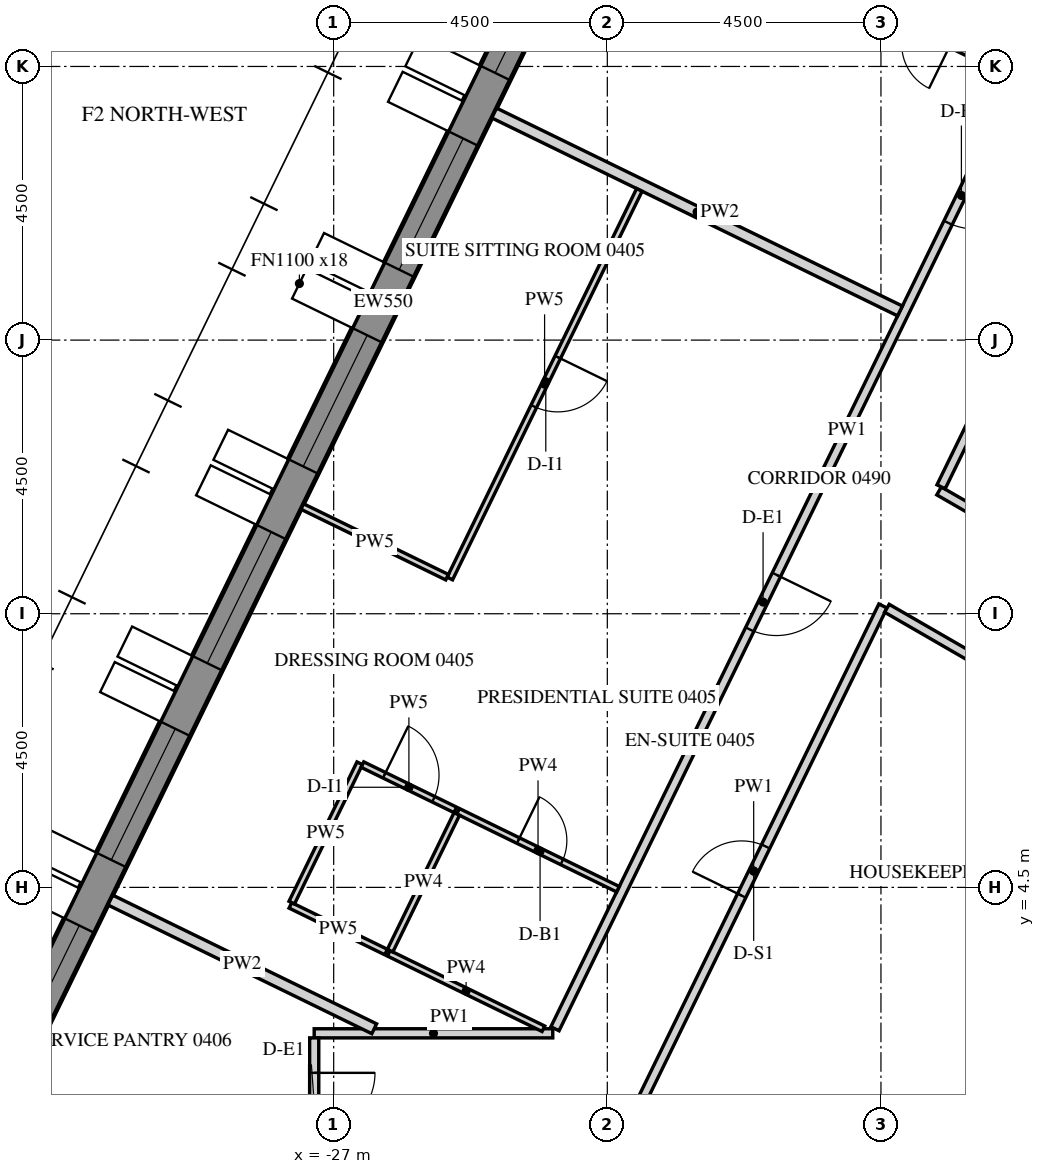
"""IFC4 building model, lengths in metres.
Left out: names, types, materials, properties, quantities, classifications, styles, units other than length and angle.
Written with IfcOpenShell. Run it as: python <this file> out.ifc"""

import sys

from ifc_helpers import new_model, si_unit, direction, frame, frame_2d, origin, place, context, subcontext, project, spatial, polyline, rectangle, outline, extrude, element, fill, save


model = new_model("IFC4")
c1 = context("Model", 3, precision=1e-05, world=origin(), true_north=direction((0.0, 1.0)))
c2 = subcontext(c1, "Body", "Model", "MODEL_VIEW")
j1 = project(units=[si_unit("LENGTHUNIT", "METRE"), si_unit("PLANEANGLEUNIT", "RADIAN")], contexts=[c1])
p1 = place(None, origin())
s1 = spatial("IfcSite", under=j1, at=p1, CompositionType="ELEMENT")
p2 = place(p1, origin())
s2 = spatial("IfcBuilding", under=s1, at=p2, CompositionType="ELEMENT")
p3 = place(p2, frame((0.0, 0.0, 68.7)))
s3 = spatial("IfcBuildingStorey", under=s2, at=p3, CompositionType="ELEMENT", Elevation=68.7)
p4 = place(p3, frame((-19.595, 27.633, -0.15), z_axis=(0.0, 0.0, 1.0), x_axis=(-0.438368285794, -0.898795441694, 0.0)))
e1 = element("IfcWall", 1, at=p4, inside=s3, PredefinedType="SOLIDWALL", context=c2, shape_type="SweptSolid", body=[
    extrude(outline(polyline([(-0.026, -0.275), (30.093, -0.275), (30.048, 0.275), (0.026, 0.275), (-0.026, -0.275)])), origin(), (0.0, 0.0, 1.0), 3.9),
])
p5 = place(p4, frame((1.236, 0.0, 1.05)))
e2 = element("IfcOpeningElement", 2, at=p5, cuts=e1, PredefinedType="OPENING", context=c2, shape_type="SweptSolid", body=[
    extrude(rectangle(XDim=2.4, YDim=2.4, at=frame_2d((1.2, 1.2))), frame((0.0, 0.285, 0.0), z_axis=(0.0, -1.0, 0.0), x_axis=(1.0, 0.0, 0.0)), (0.0, 0.0, 1.0), 0.57),
])
p6 = place(p4, frame((4.835, 0.0, 1.05)))
e3 = element("IfcOpeningElement", 3, at=p6, cuts=e1, PredefinedType="OPENING", context=c2, shape_type="SweptSolid", body=[
    extrude(rectangle(XDim=2.4, YDim=2.4, at=frame_2d((1.2, 1.2))), frame((0.0, 0.285, 0.0), z_axis=(0.0, -1.0, 0.0), x_axis=(1.0, 0.0, 0.0)), (0.0, 0.0, 1.0), 0.57),
])
p7 = place(p4, frame((8.436, 0.0, 1.05)))
e4 = element("IfcOpeningElement", 4, at=p7, cuts=e1, PredefinedType="OPENING", context=c2, shape_type="SweptSolid", body=[
    extrude(rectangle(XDim=2.4, YDim=2.4, at=frame_2d((1.2, 1.2))), frame((0.0, 0.285, 0.0), z_axis=(0.0, -1.0, 0.0), x_axis=(1.0, 0.0, 0.0)), (0.0, 0.0, 1.0), 0.57),
])
p8 = place(p4, frame((12.035, 0.0, 1.05)))
e5 = element("IfcOpeningElement", 5, at=p8, cuts=e1, PredefinedType="OPENING", context=c2, shape_type="SweptSolid", body=[
    extrude(rectangle(XDim=2.4, YDim=2.4, at=frame_2d((1.2, 1.2))), frame((0.0, 0.285, 0.0), z_axis=(0.0, -1.0, 0.0), x_axis=(1.0, 0.0, 0.0)), (0.0, 0.0, 1.0), 0.57),
])
p9 = place(p4, frame((15.635, 0.0, 1.05)))
e6 = element("IfcOpeningElement", 6, at=p9, cuts=e1, PredefinedType="OPENING", context=c2, shape_type="SweptSolid", body=[
    extrude(rectangle(XDim=2.4, YDim=2.4, at=frame_2d((1.2, 1.2))), frame((0.0, 0.285, 0.0), z_axis=(0.0, -1.0, 0.0), x_axis=(1.0, 0.0, 0.0)), (0.0, 0.0, 1.0), 0.57),
])
p10 = place(p4, frame((19.236, 0.0, 1.05)))
e7 = element("IfcOpeningElement", 7, at=p10, cuts=e1, PredefinedType="OPENING", context=c2, shape_type="SweptSolid", body=[
    extrude(rectangle(XDim=2.4, YDim=2.4, at=frame_2d((1.2, 1.2))), frame((0.0, 0.285, 0.0), z_axis=(0.0, -1.0, 0.0), x_axis=(1.0, 0.0, 0.0)), (0.0, 0.0, 1.0), 0.57),
])
p11 = place(p4, frame((22.835, 0.0, 1.05)))
e8 = element("IfcOpeningElement", 8, at=p11, cuts=e1, PredefinedType="OPENING", context=c2, shape_type="SweptSolid", body=[
    extrude(rectangle(XDim=2.4, YDim=2.4, at=frame_2d((1.2, 1.2))), frame((0.0, 0.285, 0.0), z_axis=(0.0, -1.0, 0.0), x_axis=(1.0, 0.0, 0.0)), (0.0, 0.0, 1.0), 0.57),
])
p12 = place(p4, frame((26.436, 0.0, 1.05)))
e9 = element("IfcOpeningElement", 9, at=p12, cuts=e1, PredefinedType="OPENING", context=c2, shape_type="SweptSolid", body=[
    extrude(rectangle(XDim=2.4, YDim=2.4, at=frame_2d((1.2, 1.2))), frame((0.0, 0.285, 0.0), z_axis=(0.0, -1.0, 0.0), x_axis=(1.0, 0.0, 0.0)), (0.0, 0.0, 1.0), 0.57),
])
p13 = place(p3, frame((-13.752, 21.875, 0.0), z_axis=(0.0, 0.0, 1.0), x_axis=(-0.438374473378, -0.898792423806, 0.0)))
e10 = element("IfcWall", 10, at=p13, inside=s3, PredefinedType="PARTITIONING", context=c2, shape_type="SweptSolid", body=[
    extrude(rectangle(XDim=21.918, YDim=0.15, at=frame_2d((10.959, 0.0))), origin(), (0.0, 0.0, 1.0), 2.988),
])
p14 = place(p13, frame((0.371, 0.0, 0.0)))
e11 = element("IfcOpeningElement", 11, at=p14, cuts=e10, PredefinedType="OPENING", context=c2, shape_type="SweptSolid", body=[
    extrude(rectangle(XDim=1.0, YDim=2.1, at=frame_2d((0.5, 1.05))), frame((0.0, 0.085, 0.0), z_axis=(0.0, -1.0, 0.0), x_axis=(1.0, 0.0, 0.0)), (0.0, 0.0, 1.0), 0.17),
])
p15 = place(p13, frame((6.171, 0.0, 0.0)))
e12 = element("IfcOpeningElement", 12, at=p15, cuts=e10, PredefinedType="OPENING", context=c2, shape_type="SweptSolid", body=[
    extrude(rectangle(XDim=1.0, YDim=2.1, at=frame_2d((0.5, 1.05))), frame((0.0, 0.085, 0.0), z_axis=(0.0, -1.0, 0.0), x_axis=(1.0, 0.0, 0.0)), (0.0, 0.0, 1.0), 0.17),
])
p16 = place(p13, frame((13.612, 0.0, 0.0)))
e13 = element("IfcOpeningElement", 13, at=p16, cuts=e10, PredefinedType="OPENING", context=c2, shape_type="SweptSolid", body=[
    extrude(rectangle(XDim=1.0, YDim=2.1, at=frame_2d((0.5, 1.05))), frame((0.0, 0.085, 0.0), z_axis=(0.0, -1.0, 0.0), x_axis=(1.0, 0.0, 0.0)), (0.0, 0.0, 1.0), 0.17),
])
p17 = place(p3, frame((-23.397, 2.1, 0.0), z_axis=(0.0, 0.0, 1.0), x_axis=(-1.0, 0.0, 0.0)))
e14 = element("IfcWall", 14, at=p17, inside=s3, PredefinedType="PARTITIONING", context=c2, shape_type="SweptSolid", body=[
    extrude(rectangle(XDim=3.923, YDim=0.15, at=frame_2d((1.961, 0.0))), origin(), (0.0, 0.0, 1.0), 2.988),
])
p18 = place(p3, frame((-27.32, 2.025, 0.0), z_axis=(0.0, 0.0, 1.0), x_axis=(0.0, -1.0, 0.0)))
e15 = element("IfcWall", 15, at=p18, inside=s3, PredefinedType="PARTITIONING", context=c2, shape_type="SweptSolid", body=[
    extrude(rectangle(XDim=1.725, YDim=0.15, at=frame_2d((0.862, 0.0))), origin(), (0.0, 0.0, 1.0), 2.988),
])
p19 = place(p18, frame((0.575, 0.0, 0.0)))
e16 = element("IfcOpeningElement", 16, at=p19, cuts=e15, PredefinedType="OPENING", context=c2, shape_type="SweptSolid", body=[
    extrude(rectangle(XDim=1.0, YDim=2.1, at=frame_2d((0.5, 1.05))), frame((0.0, 0.085, 0.0), z_axis=(0.0, -1.0, 0.0), x_axis=(1.0, 0.0, 0.0)), (0.0, 0.0, 1.0), 0.17),
])
p20 = place(p3, frame((-11.614, 7.884, 0.0), z_axis=(0.0, 0.0, 1.0), x_axis=(-0.866025438137, 0.4999999405, 0.0)))
e17 = element("IfcWall", 17, at=p20, inside=s3, PredefinedType="PARTITIONING", context=c2, shape_type="SweptSolid", body=[
    extrude(rectangle(XDim=6.271, YDim=0.15, at=frame_2d((3.135, 0.0))), origin(), (0.0, 0.0, 1.0), 2.988),
])
p21 = place(p3, frame((-17.011, 11.087, 0.0), z_axis=(0.0, 0.0, 1.0), x_axis=(0.43836877185, 0.898795204631, 0.0)))
e18 = element("IfcWall", 18, at=p21, inside=s3, PredefinedType="PARTITIONING", context=c2, shape_type="SweptSolid", body=[
    extrude(rectangle(XDim=10.083, YDim=0.15, at=frame_2d((5.042, 0.0))), origin(), (0.0, 0.0, 1.0), 2.988),
])
p22 = place(p3, frame((-22.219, 0.41, 0.0), z_axis=(0.0, 0.0, 1.0), x_axis=(0.438391891827, 0.898783927972, 0.0)))
e19 = element("IfcWall", 19, at=p22, inside=s3, PredefinedType="PARTITIONING", context=c2, shape_type="SweptSolid", body=[
    extrude(rectangle(XDim=9.699, YDim=0.15, at=frame_2d((4.85, 0.0))), origin(), (0.0, 0.0, 1.0), 2.988),
])
p23 = place(p22, frame((4.4, 0.0, 0.0)))
e20 = element("IfcOpeningElement", 20, at=p23, cuts=e19, PredefinedType="OPENING", context=c2, shape_type="SweptSolid", body=[
    extrude(rectangle(XDim=0.9, YDim=2.1, at=frame_2d((0.45, 1.05))), frame((0.0, 0.085, 0.0), z_axis=(0.0, -1.0, 0.0), x_axis=(1.0, 0.0, 0.0)), (0.0, 0.0, 1.0), 0.17),
])
p24 = place(p3, frame((-17.902, 9.09, 0.0), z_axis=(0.0, 0.0, 1.0), x_axis=(0.866036368755, -0.499981007633, 0.0)))
e21 = element("IfcWall", 21, at=p24, inside=s3, PredefinedType="PARTITIONING", context=c2, shape_type="SweptSolid", body=[
    extrude(rectangle(XDim=6.049, YDim=0.15, at=frame_2d((3.024, 0.0))), origin(), (0.0, 0.0, 1.0), 2.988),
])
p25 = place(p3, frame((-15.802, 17.844, 0.0), z_axis=(0.0, 0.0, 1.0), x_axis=(-0.898790906006, 0.438377585285, 0.0)))
e22 = element("IfcWall", 22, at=p25, inside=s3, PredefinedType="PARTITIONING", context=c2, shape_type="SweptSolid", body=[
    extrude(rectangle(XDim=2.925, YDim=0.1, at=frame_2d((1.462, 0.0))), origin(), (0.0, 0.0, 1.0), 2.988),
])
p26 = place(p25, frame((1.175, 0.0, 0.0)))
e23 = element("IfcOpeningElement", 23, at=p26, cuts=e22, PredefinedType="OPENING", context=c2, shape_type="SweptSolid", body=[
    extrude(rectangle(XDim=0.8, YDim=2.1, at=frame_2d((0.4, 1.05))), frame((0.0, 0.06, 0.0), z_axis=(0.0, -1.0, 0.0), x_axis=(1.0, 0.0, 0.0)), (0.0, 0.0, 1.0), 0.12),
])
p27 = place(p3, frame((-24.36, 17.234, 0.0), z_axis=(0.0, 0.0, 1.0), x_axis=(0.898796252669, -0.438366623032, 0.0)))
e24 = element("IfcWall", 24, at=p27, inside=s3, PredefinedType="PARTITIONING", context=c2, shape_type="SweptSolid", body=[
    extrude(rectangle(XDim=7.425, YDim=0.18, at=frame_2d((3.712, 0.0))), origin(), (0.0, 0.0, 1.0), 2.988),
])
p28 = place(p3, frame((-23.551, 2.175, 0.0), z_axis=(0.0, 0.0, 1.0), x_axis=(-0.89881903386, 0.438319910991, 0.0)))
e25 = element("IfcWall", 25, at=p28, inside=s3, PredefinedType="PARTITIONING", context=c2, shape_type="SweptSolid", body=[
    extrude(rectangle(XDim=2.829, YDim=0.1, at=frame_2d((1.415, 0.0))), origin(), (0.0, 0.0, 1.0), 2.988),
])
p29 = place(p3, frame((-24.954, 5.752, 0.0), z_axis=(0.0, 0.0, 1.0), x_axis=(0.89880694479, -0.438344699976, 0.0)))
e26 = element("IfcWall", 26, at=p29, inside=s3, PredefinedType="PARTITIONING", context=c2, shape_type="SweptSolid", body=[
    extrude(rectangle(XDim=2.925, YDim=0.1, at=frame_2d((1.462, 0.0))), origin(), (0.0, 0.0, 1.0), 2.988),
])
p30 = place(p29, frame((1.1, 0.0, 0.0)))
e27 = element("IfcOpeningElement", 27, at=p30, cuts=e26, PredefinedType="OPENING", context=c2, shape_type="SweptSolid", body=[
    extrude(rectangle(XDim=0.8, YDim=2.1, at=frame_2d((0.4, 1.05))), frame((0.0, 0.06, 0.0), z_axis=(0.0, -1.0, 0.0), x_axis=(1.0, 0.0, 0.0)), (0.0, 0.0, 1.0), 0.12),
])
p31 = place(p3, frame((-26.139, 3.437, 0.0), z_axis=(0.0, 0.0, 1.0), x_axis=(-0.89881938742, 0.438319185981, 0.0)))
e28 = element("IfcWall", 28, at=p31, inside=s3, PredefinedType="PARTITIONING", context=c2, shape_type="SweptSolid", body=[
    extrude(rectangle(XDim=1.75, YDim=0.1, at=frame_2d((0.875, 0.0))), origin(), (0.0, 0.0, 1.0), 2.988),
])
p32 = place(p3, frame((-27.69, 4.249, 0.0), z_axis=(0.0, 0.0, 1.0), x_axis=(0.438384020656, 0.898787767181, 0.0)))
e29 = element("IfcWall", 29, at=p32, inside=s3, PredefinedType="PARTITIONING", context=c2, shape_type="SweptSolid", body=[
    extrude(rectangle(XDim=2.55, YDim=0.1, at=frame_2d((1.275, 0.0))), origin(), (0.0, 0.0, 1.0), 2.988),
])
p33 = place(p3, frame((-26.527, 6.519, 0.0), z_axis=(0.0, 0.0, 1.0), x_axis=(0.898807091918, -0.438344398296, 0.0)))
e30 = element("IfcWall", 30, at=p33, inside=s3, PredefinedType="PARTITIONING", context=c2, shape_type="SweptSolid", body=[
    extrude(rectangle(XDim=1.7, YDim=0.1, at=frame_2d((0.85, 0.0))), origin(), (0.0, 0.0, 1.0), 2.988),
])
p34 = place(p33, frame((0.4, 0.0, 0.0)))
e31 = element("IfcOpeningElement", 31, at=p34, cuts=e30, PredefinedType="OPENING", context=c2, shape_type="SweptSolid", body=[
    extrude(rectangle(XDim=0.9, YDim=2.1, at=frame_2d((0.45, 1.05))), frame((0.0, 0.06, 0.0), z_axis=(0.0, -1.0, 0.0), x_axis=(1.0, 0.0, 0.0)), (0.0, 0.0, 1.0), 0.12),
])
p35 = place(p3, frame((-21.973, 15.97, 0.0), z_axis=(0.0, 0.0, 1.0), x_axis=(-0.438360036982, -0.898799464829, 0.0)))
e32 = element("IfcWall", 32, at=p35, inside=s3, PredefinedType="PARTITIONING", context=c2, shape_type="SweptSolid", body=[
    extrude(rectangle(XDim=7.11, YDim=0.1, at=frame_2d((3.555, 0.0))), origin(), (0.0, 0.0, 1.0), 2.988),
])
p36 = place(p35, frame((3.06, 0.0, 0.0)))
e33 = element("IfcOpeningElement", 33, at=p36, cuts=e32, PredefinedType="OPENING", context=c2, shape_type="SweptSolid", body=[
    extrude(rectangle(XDim=0.9, YDim=2.1, at=frame_2d((0.45, 1.05))), frame((0.0, 0.06, 0.0), z_axis=(0.0, -1.0, 0.0), x_axis=(1.0, 0.0, 0.0)), (0.0, 0.0, 1.0), 0.12),
])
p37 = place(p3, frame((-25.135, 9.601, 0.0), z_axis=(0.0, 0.0, 1.0), x_axis=(-0.898787925725, 0.438383695602, 0.0)))
e34 = element("IfcWall", 34, at=p37, inside=s3, PredefinedType="PARTITIONING", context=c2, shape_type="SweptSolid", body=[
    extrude(rectangle(XDim=2.65, YDim=0.1, at=frame_2d((1.325, 0.0))), origin(), (0.0, 0.0, 1.0), 2.988),
])
p38 = place(p3, frame((-30.673, 4.292, 0.0), z_axis=(0.0, 0.0, 1.0), x_axis=(0.898812662672, -0.438332975512, 0.0)))
e35 = element("IfcWall", 35, at=p38, inside=s3, PredefinedType="PARTITIONING", context=c2, shape_type="SweptSolid", body=[
    extrude(rectangle(XDim=4.828, YDim=0.18, at=frame_2d((2.414, 0.0))), origin(), (0.0, 0.0, 1.0), 2.988),
])
p39 = place(p3, frame((-24.976, 5.707, 0.0), z_axis=(0.0, 0.0, 1.0), x_axis=(-0.438363988158, -0.898797537761, 0.0)))
e36 = element("IfcWall", 36, at=p39, inside=s3, PredefinedType="PARTITIONING", context=c2, shape_type="SweptSolid", body=[
    extrude(rectangle(XDim=2.5, YDim=0.1, at=frame_2d((1.25, 0.0))), origin(), (0.0, 0.0, 1.0), 2.988),
])
p40 = place(p7, frame((0.0, 0.205, 0.0)))
e37 = element("IfcWindow", 37, at=p40, inside=s3, PartitioningType="DOUBLE_PANEL_VERTICAL", PredefinedType="WINDOW", context=c2, shape_type="SweptSolid", body=[
    extrude(rectangle(XDim=2.4, YDim=2.4, at=frame_2d((1.2, 1.2))), frame((0.0, 0.03, 0.0), z_axis=(0.0, -1.0, 0.0), x_axis=(1.0, 0.0, 0.0)), (0.0, 0.0, 1.0), 0.06),
])
fill(e4, e37)
p41 = place(p8, frame((0.0, 0.205, 0.0)))
e38 = element("IfcWindow", 38, at=p41, inside=s3, PartitioningType="DOUBLE_PANEL_VERTICAL", PredefinedType="WINDOW", context=c2, shape_type="SweptSolid", body=[
    extrude(rectangle(XDim=2.4, YDim=2.4, at=frame_2d((1.2, 1.2))), frame((0.0, 0.03, 0.0), z_axis=(0.0, -1.0, 0.0), x_axis=(1.0, 0.0, 0.0)), (0.0, 0.0, 1.0), 0.06),
])
fill(e5, e38)
p42 = place(p9, frame((0.0, 0.205, 0.0)))
e39 = element("IfcWindow", 39, at=p42, inside=s3, PartitioningType="DOUBLE_PANEL_VERTICAL", PredefinedType="WINDOW", context=c2, shape_type="SweptSolid", body=[
    extrude(rectangle(XDim=2.4, YDim=2.4, at=frame_2d((1.2, 1.2))), frame((0.0, 0.03, 0.0), z_axis=(0.0, -1.0, 0.0), x_axis=(1.0, 0.0, 0.0)), (0.0, 0.0, 1.0), 0.06),
])
fill(e6, e39)
p43 = place(p10, frame((0.0, 0.205, 0.0)))
e40 = element("IfcWindow", 40, at=p43, inside=s3, PartitioningType="DOUBLE_PANEL_VERTICAL", PredefinedType="WINDOW", context=c2, shape_type="SweptSolid", body=[
    extrude(rectangle(XDim=2.4, YDim=2.4, at=frame_2d((1.2, 1.2))), frame((0.0, 0.03, 0.0), z_axis=(0.0, -1.0, 0.0), x_axis=(1.0, 0.0, 0.0)), (0.0, 0.0, 1.0), 0.06),
])
fill(e7, e40)
p44 = place(p11, frame((0.0, 0.205, 0.0)))
e41 = element("IfcWindow", 41, at=p44, inside=s3, PartitioningType="DOUBLE_PANEL_VERTICAL", PredefinedType="WINDOW", context=c2, shape_type="SweptSolid", body=[
    extrude(rectangle(XDim=2.4, YDim=2.4, at=frame_2d((1.2, 1.2))), frame((0.0, 0.03, 0.0), z_axis=(0.0, -1.0, 0.0), x_axis=(1.0, 0.0, 0.0)), (0.0, 0.0, 1.0), 0.06),
])
fill(e8, e41)
p45 = place(p12, frame((0.0, 0.205, 0.0)))
e42 = element("IfcWindow", 42, at=p45, inside=s3, PartitioningType="DOUBLE_PANEL_VERTICAL", PredefinedType="WINDOW", context=c2, shape_type="SweptSolid", body=[
    extrude(rectangle(XDim=2.4, YDim=2.4, at=frame_2d((1.2, 1.2))), frame((0.0, 0.03, 0.0), z_axis=(0.0, -1.0, 0.0), x_axis=(1.0, 0.0, 0.0)), (0.0, 0.0, 1.0), 0.06),
])
fill(e9, e42)
p46 = place(p15, origin())
e43 = element("IfcDoor", 43, at=p46, inside=s3, OperationType="SINGLE_SWING_LEFT", PredefinedType="DOOR", context=c2, shape_type="SweptSolid", body=[
    extrude(rectangle(XDim=1.0, YDim=2.1, at=frame_2d((0.5, 1.05))), frame((0.0, 0.025, 0.0), z_axis=(0.0, -1.0, 0.0), x_axis=(1.0, 0.0, 0.0)), (0.0, 0.0, 1.0), 0.05),
])
fill(e12, e43)
p47 = place(p16, origin())
e44 = element("IfcDoor", 44, at=p47, inside=s3, OperationType="SINGLE_SWING_LEFT", PredefinedType="DOOR", context=c2, shape_type="SweptSolid", body=[
    extrude(rectangle(XDim=1.0, YDim=2.1, at=frame_2d((0.5, 1.05))), frame((0.0, 0.025, 0.0), z_axis=(0.0, -1.0, 0.0), x_axis=(1.0, 0.0, 0.0)), (0.0, 0.0, 1.0), 0.05),
])
fill(e13, e44)
p48 = place(p30, origin())
e45 = element("IfcDoor", 45, at=p48, inside=s3, OperationType="SINGLE_SWING_LEFT", PredefinedType="DOOR", context=c2, shape_type="SweptSolid", body=[
    extrude(rectangle(XDim=0.8, YDim=2.1, at=frame_2d((0.4, 1.05))), frame((0.0, 0.025, 0.0), z_axis=(0.0, -1.0, 0.0), x_axis=(1.0, 0.0, 0.0)), (0.0, 0.0, 1.0), 0.05),
])
fill(e27, e45)
p49 = place(p34, origin())
e46 = element("IfcDoor", 46, at=p49, inside=s3, OperationType="SINGLE_SWING_RIGHT", PredefinedType="DOOR", context=c2, shape_type="SweptSolid", body=[
    extrude(rectangle(XDim=0.9, YDim=2.1, at=frame_2d((0.45, 1.05))), frame((0.0, 0.025, 0.0), z_axis=(0.0, -1.0, 0.0), x_axis=(1.0, 0.0, 0.0)), (0.0, 0.0, 1.0), 0.05),
])
fill(e31, e46)
p50 = place(p36, origin())
e47 = element("IfcDoor", 47, at=p50, inside=s3, OperationType="SINGLE_SWING_RIGHT", PredefinedType="DOOR", context=c2, shape_type="SweptSolid", body=[
    extrude(rectangle(XDim=0.9, YDim=2.1, at=frame_2d((0.45, 1.05))), frame((0.0, 0.025, 0.0), z_axis=(0.0, -1.0, 0.0), x_axis=(1.0, 0.0, 0.0)), (0.0, 0.0, 1.0), 0.05),
])
fill(e33, e47)
p51 = place(p19, origin())
e48 = element("IfcDoor", 48, at=p51, inside=s3, OperationType="SINGLE_SWING_LEFT", PredefinedType="DOOR", context=c2, shape_type="SweptSolid", body=[
    extrude(rectangle(XDim=1.0, YDim=2.1, at=frame_2d((0.5, 1.05))), frame((0.0, 0.025, 0.0), z_axis=(0.0, -1.0, 0.0), x_axis=(1.0, 0.0, 0.0)), (0.0, 0.0, 1.0), 0.05),
])
fill(e16, e48)
p52 = place(p23, origin())
e49 = element("IfcDoor", 49, at=p52, inside=s3, OperationType="SINGLE_SWING_LEFT", PredefinedType="DOOR", context=c2, shape_type="SweptSolid", body=[
    extrude(rectangle(XDim=0.9, YDim=2.1, at=frame_2d((0.45, 1.05))), frame((0.0, 0.025, 0.0), z_axis=(0.0, -1.0, 0.0), x_axis=(1.0, 0.0, 0.0)), (0.0, 0.0, 1.0), 0.05),
])
fill(e20, e49)
save(model, sys.argv[1])
